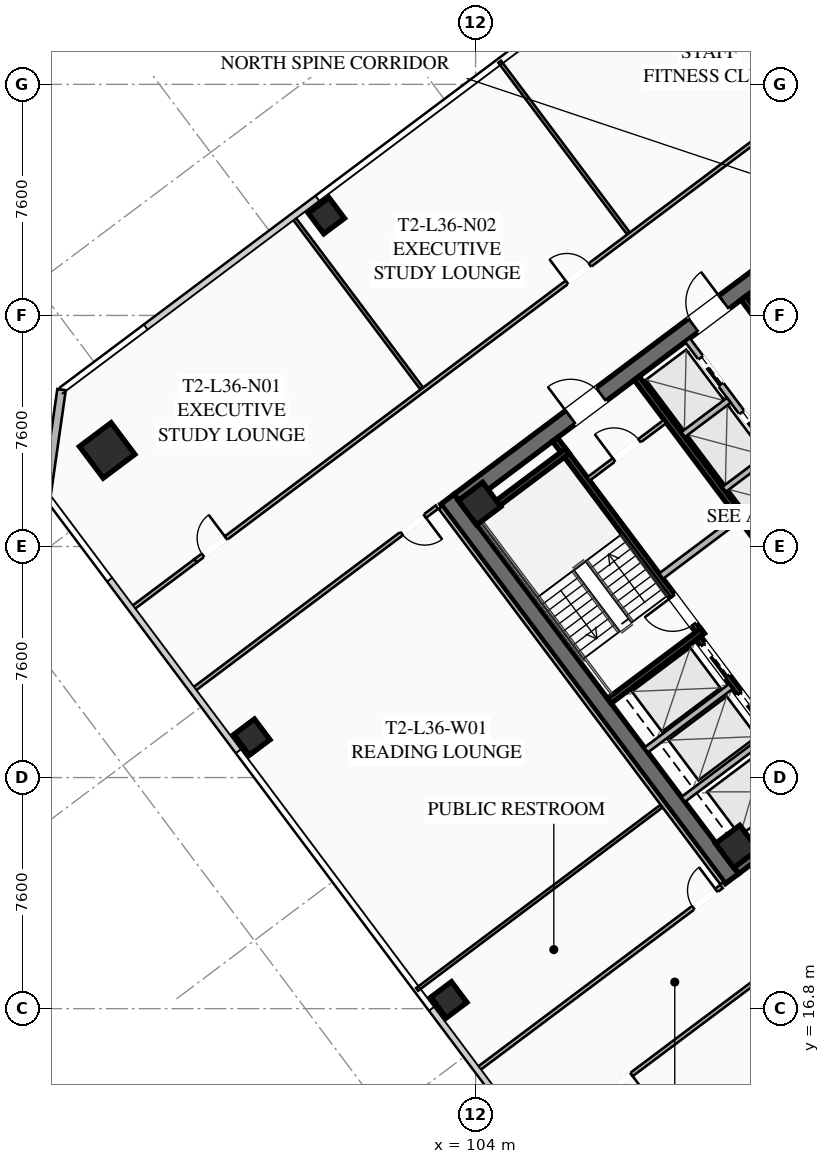
"""IFC4 building model, lengths in metres.
Left out: names, types, materials, properties, quantities, classifications, styles, units other than length and angle.
Written with IfcOpenShell. Run it as: python <this file> out.ifc"""

import sys

from ifc_helpers import new_model, si_unit, direction, frame, frame_2d, origin, origin_2d, place, context, subcontext, project, spatial, rectangle, hollow_rectangle, extrude, element, fill, save


model = new_model("IFC4")
c1 = context("Model", 3, precision=1e-05, world=origin(), true_north=direction((0.0, 1.0)))
c2 = subcontext(c1, "Body", "Model", "MODEL_VIEW")
j1 = project(units=[si_unit("LENGTHUNIT", "METRE"), si_unit("PLANEANGLEUNIT", "RADIAN")], contexts=[c1])
p1 = place(None, origin())
s1 = spatial("IfcSite", under=j1, at=p1, CompositionType="ELEMENT")
p2 = place(p1, origin())
s2 = spatial("IfcBuilding", under=s1, at=p2, CompositionType="ELEMENT")
p3 = place(p2, frame((0.0, 0.0, 135.7)))
s3 = spatial("IfcBuildingStorey", under=s2, at=p3, CompositionType="ELEMENT", Elevation=135.7)
p4 = place(p3, frame((112.436, 21.077, 0.0), z_axis=(0.0, 0.0, 1.0), x_axis=(-0.600005007985, 0.799996243986, 0.0)))
e1 = element("IfcWall", 1, at=p4, inside=s3, PredefinedType="SHEAR", context=c2, shape_type="SweptSolid", body=[
    extrude(rectangle(XDim=15.6, YDim=0.55, at=frame_2d((7.8, 0.0))), origin(), (0.0, 0.0, 1.0), 3.55),
])
p5 = place(p3, frame((124.539, 30.498, 0.0), z_axis=(0.0, 0.0, 1.0), x_axis=(-0.799998054672, -0.600002593761, 0.0)))
e2 = element("IfcWall", 2, at=p5, inside=s3, PredefinedType="SHEAR", context=c2, shape_type="SweptSolid", body=[
    extrude(rectangle(XDim=15.06, YDim=0.55, at=frame_2d((7.53, 0.0))), origin(), (0.0, 0.0, 1.0), 3.55),
])
p6 = place(p5, frame((9.23, 0.0, 0.0)))
e3 = element("IfcOpeningElement", 3, at=p6, cuts=e2, PredefinedType="OPENING", context=c2, shape_type="SweptSolid", body=[
    extrude(rectangle(XDim=1.25, YDim=2.25, at=frame_2d((0.625, 1.125))), frame((0.0, 0.285, 0.0), z_axis=(0.0, -1.0, 0.0), x_axis=(1.0, 0.0, 0.0)), (0.0, 0.0, 1.0), 0.57),
])
p7 = place(p5, frame((4.18, 0.0, 0.0)))
e4 = element("IfcOpeningElement", 4, at=p7, cuts=e2, PredefinedType="OPENING", context=c2, shape_type="SweptSolid", body=[
    extrude(rectangle(XDim=1.25, YDim=2.25, at=frame_2d((0.625, 1.125))), frame((0.0, 0.285, 0.0), z_axis=(0.0, -1.0, 0.0), x_axis=(1.0, 0.0, 0.0)), (0.0, 0.0, 1.0), 0.57),
])
p8 = place(p3, frame((103.461, 33.502, 0.0), z_axis=(0.0, 0.0, 1.0), x_axis=(0.799998054672, 0.600002593761, 0.0)))
e5 = element("IfcWall", 5, at=p8, inside=s3, PredefinedType="SHEAR", context=c2, shape_type="SweptSolid", body=[
    extrude(rectangle(XDim=15.06, YDim=0.55, at=frame_2d((7.53, 0.0))), origin(), (0.0, 0.0, 1.0), 3.55),
])
p9 = place(p8, frame((4.58, 0.0, 0.0)))
e6 = element("IfcOpeningElement", 6, at=p9, cuts=e5, PredefinedType="OPENING", context=c2, shape_type="SweptSolid", body=[
    extrude(rectangle(XDim=1.25, YDim=2.25, at=frame_2d((0.625, 1.125))), frame((0.0, 0.285, 0.0), z_axis=(0.0, -1.0, 0.0), x_axis=(1.0, 0.0, 0.0)), (0.0, 0.0, 1.0), 0.57),
])
p10 = place(p8, frame((9.63, 0.0, 0.0)))
e7 = element("IfcOpeningElement", 7, at=p10, cuts=e5, PredefinedType="OPENING", context=c2, shape_type="SweptSolid", body=[
    extrude(rectangle(XDim=1.25, YDim=2.25, at=frame_2d((0.625, 1.125))), frame((0.0, 0.285, 0.0), z_axis=(0.0, -1.0, 0.0), x_axis=(1.0, 0.0, 0.0)), (0.0, 0.0, 1.0), 0.57),
])
for number, where, z_axis, x_axis in (
    (8, (112.59, 22.13, 0.0), (0.0, 0.0, 1.0), (0.8, 0.6, 0.0)),
    (9, (104.13, 33.41, 0.0), (0.0, 0.0, 1.0), (0.8, 0.6, 0.0)),
):
    element("IfcColumn", number, at=place(p3, frame(where, z_axis=z_axis, x_axis=x_axis)), inside=s3, PredefinedType="COLUMN", context=c2, shape_type="SweptSolid", body=[
        extrude(hollow_rectangle(XDim=1.0, YDim=1.0, WallThickness=0.04, at=origin_2d()), origin(), (0.0, 0.0, 1.0), 3.37),
    ])
p11 = place(p3, frame((91.88, 35.16, 0.0), z_axis=(0.0, 0.0, 1.0), x_axis=(0.799999996291, 0.600000004945, 0.0)))
e10 = element("IfcColumn", 10, at=p11, inside=s3, PredefinedType="COLUMN", context=c2, shape_type="SweptSolid", body=[
    extrude(hollow_rectangle(XDim=1.3, YDim=1.3, WallThickness=0.05, at=origin_2d()), origin(), (0.0, 0.0, 1.0), 3.37),
])
for number, where, z_axis, x_axis in (
    (11, (99.09, 42.88, 0.0), (0.0, 0.0, 1.0), (0.8, 0.6, 0.0)),
    (12, (96.64, 25.73, 0.0), (0.0, 0.0, 1.0), (0.8, 0.6, 0.0)),
    (13, (103.12, 17.09, 0.0), (0.0, 0.0, 1.0), (0.8, 0.6, 0.0)),
):
    element("IfcColumn", number, at=place(p3, frame(where, z_axis=z_axis, x_axis=x_axis)), inside=s3, PredefinedType="COLUMN", context=c2, shape_type="SweptSolid", body=[
        extrude(hollow_rectangle(XDim=0.85, YDim=0.85, WallThickness=0.035, at=origin_2d()), origin(), (0.0, 0.0, 1.0), 3.37),
    ])
p12 = place(p3, frame((89.88, 33.66, 0.0), z_axis=(0.0, 0.0, 1.0), x_axis=(0.141421356237, 0.989949493661, 0.0)))
e14 = element("IfcWall", 14, at=p12, inside=s3, PredefinedType="SOLIDWALL", context=c2, shape_type="SweptSolid", body=[
    extrude(rectangle(XDim=3.536, YDim=0.28, at=frame_2d((1.768, 0.0))), origin(), (0.0, 0.0, 1.0), 3.37),
])
p13 = place(p3, frame((111.44, 29.08, 0.0), z_axis=(0.0, 0.0, 1.0), x_axis=(-0.59999029481, 0.8000072788, 0.0)))
e15 = element("IfcWall", 15, at=p13, inside=s3, PredefinedType="SHEAR", context=c2, shape_type="SweptSolid", body=[
    extrude(rectangle(XDim=8.05, YDim=0.2, at=frame_2d((4.025, 0.0))), origin(), (0.0, 0.0, 1.0), 3.37),
])
p14 = place(p13, frame((0.45, 0.0, 0.0)))
e16 = element("IfcOpeningElement", 16, at=p14, cuts=e15, PredefinedType="OPENING", context=c2, shape_type="SweptSolid", body=[
    extrude(rectangle(XDim=1.15, YDim=2.2, at=frame_2d((0.575, 1.1))), frame((0.0, 0.11, 0.0), z_axis=(0.0, -1.0, 0.0), x_axis=(1.0, 0.0, 0.0)), (0.0, 0.0, 1.0), 0.22),
])
for number, where, z_axis, x_axis in (
    (17, (108.396, 26.922, 0.0), (0.0, 0.0, 1.0), (0.8, 0.6, 0.0)),
    (18, (103.956, 32.842, 0.0), (0.0, 0.0, 1.0), (0.8, 0.6, 0.0)),
):
    element("IfcWall", number, at=place(p3, frame(where, z_axis=z_axis, x_axis=x_axis)), inside=s3, PredefinedType="SHEAR", context=c2, shape_type="SweptSolid", body=[
        extrude(rectangle(XDim=3.83, YDim=0.2, at=frame_2d((1.915, 0.0))), origin(), (0.0, 0.0, 1.0), 3.37),
    ])
p15 = place(p3, frame((117.998, 25.936, 0.0), z_axis=(0.0, 0.0, 1.0), x_axis=(-0.600002693989, 0.799997979501, 0.0)))
e19 = element("IfcWall", 19, at=p15, inside=s3, PredefinedType="SHEAR", context=c2, shape_type="SweptSolid", body=[
    extrude(rectangle(XDim=14.5, YDim=0.2, at=frame_2d((7.25, 0.0))), origin(), (0.0, 0.0, 1.0), 3.37),
])
p16 = place(p3, frame((110.104, 31.028, 0.0), z_axis=(0.0, 0.0, 1.0), x_axis=(0.800018601094, 0.59997519774, 0.0)))
e20 = element("IfcWall", 20, at=p16, inside=s3, PredefinedType="SOLIDWALL", context=c2, shape_type="SweptSolid", body=[
    extrude(rectangle(XDim=3.15, YDim=0.22, at=frame_2d((1.575, 0.0))), origin(), (0.0, 0.0, 1.0), 2.723),
])
p17 = place(p3, frame((115.19, 23.83, 0.0), z_axis=(0.0, 0.0, 1.0), x_axis=(-0.599993943644, 0.800004542231, 0.0)))
e21 = element("IfcWall", 21, at=p17, inside=s3, PredefinedType="SHEAR", context=c2, shape_type="SweptSolid", body=[
    extrude(rectangle(XDim=6.45, YDim=0.2, at=frame_2d((3.225, 0.0))), origin(), (0.0, 0.0, 1.0), 3.37),
])
p18 = place(p17, frame((4.875, 0.0, 0.0)))
e22 = element("IfcOpeningElement", 22, at=p18, cuts=e21, PredefinedType="OPENING", context=c2, shape_type="SweptSolid", body=[
    extrude(rectangle(XDim=1.3, YDim=2.25, at=frame_2d((0.65, 1.125))), frame((0.0, 0.11, 0.0), z_axis=(0.0, -1.0, 0.0), x_axis=(1.0, 0.0, 0.0)), (0.0, 0.0, 1.0), 0.22),
])
p19 = place(p17, frame((2.875, 0.0, 0.0)))
e23 = element("IfcOpeningElement", 23, at=p19, cuts=e21, PredefinedType="OPENING", context=c2, shape_type="SweptSolid", body=[
    extrude(rectangle(XDim=1.3, YDim=2.25, at=frame_2d((0.65, 1.125))), frame((0.0, 0.11, 0.0), z_axis=(0.0, -1.0, 0.0), x_axis=(1.0, 0.0, 0.0)), (0.0, 0.0, 1.0), 0.22),
])
p20 = place(p17, frame((0.675, 0.0, 0.0)))
e24 = element("IfcOpeningElement", 24, at=p20, cuts=e21, PredefinedType="OPENING", context=c2, shape_type="SweptSolid", body=[
    extrude(rectangle(XDim=1.3, YDim=2.25, at=frame_2d((0.65, 1.125))), frame((0.0, 0.11, 0.0), z_axis=(0.0, -1.0, 0.0), x_axis=(1.0, 0.0, 0.0)), (0.0, 0.0, 1.0), 0.22),
])
for number, where, z_axis, x_axis in (
    (25, (110.826, 23.682, 0.0), (0.0, 0.0, 1.0), (0.8, 0.6, 0.0)),
    (26, (109.608, 25.306, 0.0), (0.0, 0.0, 1.0), (0.8, 0.6, 0.0)),
):
    element("IfcWall", number, at=place(p3, frame(where, z_axis=z_axis, x_axis=x_axis)), inside=s3, PredefinedType="SOLIDWALL", context=c2, shape_type="SweptSolid", body=[
        extrude(rectangle(XDim=3.48, YDim=0.2, at=frame_2d((1.74, 0.0))), origin(), (0.0, 0.0, 1.0), 3.37),
    ])
p21 = place(p3, frame((112.81, 40.17, 0.0), z_axis=(0.0, 0.0, 1.0), x_axis=(0.599993943644, -0.800004542231, 0.0)))
e27 = element("IfcWall", 27, at=p21, inside=s3, PredefinedType="SHEAR", context=c2, shape_type="SweptSolid", body=[
    extrude(rectangle(XDim=6.45, YDim=0.2, at=frame_2d((3.225, 0.0))), origin(), (0.0, 0.0, 1.0), 3.37),
])
p22 = place(p3, frame((107.71, 34.22, 0.0), z_axis=(0.0, 0.0, 1.0), x_axis=(0.799981399002, 0.60002480053, 0.0)))
e28 = element("IfcWall", 28, at=p22, inside=s3, PredefinedType="PARTITIONING", context=c2, shape_type="SweptSolid", body=[
    extrude(rectangle(XDim=3.15, YDim=0.135, at=frame_2d((1.575, 0.0))), origin(), (0.0, 0.0, 1.0), 2.723),
])
p23 = place(p22, frame((1.05, 0.0, 0.0)))
e29 = element("IfcOpeningElement", 29, at=p23, cuts=e28, PredefinedType="OPENING", context=c2, shape_type="SweptSolid", body=[
    extrude(rectangle(XDim=1.05, YDim=2.2, at=frame_2d((0.525, 1.1))), frame((0.0, 0.077, 0.0), z_axis=(0.0, -1.0, 0.0), x_axis=(1.0, 0.0, 0.0)), (0.0, 0.0, 1.0), 0.155),
])
p24 = place(p3, frame((115.11, 33.27, 0.0), z_axis=(0.0, 0.0, 1.0), x_axis=(-0.600011322243, 0.799991508192, 0.0)))
e30 = element("IfcWall", 30, at=p24, inside=s3, PredefinedType="SOLIDWALL", context=c2, shape_type="SweptSolid", body=[
    extrude(rectangle(XDim=6.9, YDim=0.2, at=frame_2d((3.45, 0.0))), origin(), (0.0, 0.0, 1.0), 3.37),
])
p25 = place(p24, frame((0.575, 0.0, 0.0)))
e31 = element("IfcOpeningElement", 31, at=p25, cuts=e30, PredefinedType="OPENING", context=c2, shape_type="SweptSolid", body=[
    extrude(rectangle(XDim=1.1, YDim=2.2, at=frame_2d((0.55, 1.1))), frame((0.0, 0.11, 0.0), z_axis=(0.0, -1.0, 0.0), x_axis=(1.0, 0.0, 0.0)), (0.0, 0.0, 1.0), 0.22),
])
p26 = place(p24, frame((2.825, 0.0, 0.0)))
e32 = element("IfcOpeningElement", 32, at=p26, cuts=e30, PredefinedType="OPENING", context=c2, shape_type="SweptSolid", body=[
    extrude(rectangle(XDim=1.1, YDim=2.2, at=frame_2d((0.55, 1.1))), frame((0.0, 0.11, 0.0), z_axis=(0.0, -1.0, 0.0), x_axis=(1.0, 0.0, 0.0)), (0.0, 0.0, 1.0), 0.22),
])
p27 = place(p24, frame((5.075, 0.0, 0.0)))
e33 = element("IfcOpeningElement", 33, at=p27, cuts=e30, PredefinedType="OPENING", context=c2, shape_type="SweptSolid", body=[
    extrude(rectangle(XDim=1.1, YDim=2.2, at=frame_2d((0.55, 1.1))), frame((0.0, 0.11, 0.0), z_axis=(0.0, -1.0, 0.0), x_axis=(1.0, 0.0, 0.0)), (0.0, 0.0, 1.0), 0.22),
])
p28 = place(p3, frame((112.176, 33.882, 0.0), z_axis=(0.0, 0.0, 1.0), x_axis=(0.8, 0.6, 0.0)))
e34 = element("IfcWall", 34, at=p28, inside=s3, PredefinedType="SOLIDWALL", context=c2, shape_type="SweptSolid", body=[
    extrude(rectangle(XDim=1.88, YDim=0.2, at=frame_2d((0.94, 0.0))), origin(), (0.0, 0.0, 1.0), 3.37),
])
p29 = place(p3, frame((110.826, 35.682, 0.0), z_axis=(0.0, 0.0, 1.0), x_axis=(0.799984418148, 0.600020775241, 0.0)))
e35 = element("IfcWall", 35, at=p29, inside=s3, PredefinedType="SOLIDWALL", context=c2, shape_type="SweptSolid", body=[
    extrude(rectangle(XDim=1.88, YDim=0.2, at=frame_2d((0.94, 0.0))), origin(), (0.0, 0.0, 1.0), 3.37),
])
p30 = place(p3, frame((94.79, 31.53, 0.0), z_axis=(0.0, 0.0, 1.0), x_axis=(0.8, 0.6, 0.0)))
e36 = element("IfcWall", 36, at=p30, inside=s3, PredefinedType="PARTITIONING", context=c2, shape_type="SweptSolid", body=[
    extrude(rectangle(XDim=31.3, YDim=0.135, at=frame_2d((15.65, 0.0))), origin(), (0.0, 0.0, 1.0), 2.723),
])
p31 = place(p30, frame((0.3, 0.0, 0.0)))
e37 = element("IfcOpeningElement", 37, at=p31, cuts=e36, PredefinedType="OPENING", context=c2, shape_type="SweptSolid", body=[
    extrude(rectangle(XDim=0.95, YDim=2.05, at=frame_2d((0.475, 1.025))), frame((0.0, 0.077, 0.0), z_axis=(0.0, -1.0, 0.0), x_axis=(1.0, 0.0, 0.0)), (0.0, 0.0, 1.0), 0.155),
])
p32 = place(p30, frame((15.263, 0.0, 0.0)))
e38 = element("IfcOpeningElement", 38, at=p32, cuts=e36, PredefinedType="OPENING", context=c2, shape_type="SweptSolid", body=[
    extrude(rectangle(XDim=0.95, YDim=2.05, at=frame_2d((0.475, 1.025))), frame((0.0, 0.077, 0.0), z_axis=(0.0, -1.0, 0.0), x_axis=(1.0, 0.0, 0.0)), (0.0, 0.0, 1.0), 0.155),
])
p33 = place(p30, frame((30.05, 0.0, 0.0)))
e39 = element("IfcOpeningElement", 39, at=p33, cuts=e36, PredefinedType="OPENING", context=c2, shape_type="SweptSolid", body=[
    extrude(rectangle(XDim=0.95, YDim=2.05, at=frame_2d((0.475, 1.025))), frame((0.0, 0.077, 0.0), z_axis=(0.0, -1.0, 0.0), x_axis=(1.0, 0.0, 0.0)), (0.0, 0.0, 1.0), 0.155),
])
p34 = place(p3, frame((92.686, 29.952, 0.0), z_axis=(0.0, 0.0, 1.0), x_axis=(0.799977721118, 0.600029704027, 0.0)))
e40 = element("IfcWall", 40, at=p34, inside=s3, PredefinedType="PARTITIONING", context=c2, shape_type="SweptSolid", body=[
    extrude(rectangle(XDim=2.63, YDim=0.135, at=frame_2d((1.315, 0.0))), origin(), (0.0, 0.0, 1.0), 2.723),
])
p35 = place(p3, frame((102.222, 37.204, 0.0), z_axis=(0.0, 0.0, 1.0), x_axis=(-0.600005540843, 0.799995844338, 0.0)))
e41 = element("IfcWall", 41, at=p35, inside=s3, PredefinedType="PARTITIONING", context=c2, shape_type="SweptSolid", body=[
    extrude(rectangle(XDim=7.05, YDim=0.11, at=frame_2d((3.525, 0.0))), origin(), (0.0, 0.0, 1.0), 2.723),
])
p36 = place(p3, frame((109.022, 42.304, 0.0), z_axis=(0.0, 0.0, 1.0), x_axis=(-0.599988918536, 0.800008310978, 0.0)))
e42 = element("IfcWall", 42, at=p36, inside=s3, PredefinedType="PARTITIONING", context=c2, shape_type="SweptSolid", body=[
    extrude(rectangle(XDim=7.05, YDim=0.11, at=frame_2d((3.525, 0.0))), origin(), (0.0, 0.0, 1.0), 2.723),
])
p37 = place(p3, frame((133.102, 32.614, 0.0), z_axis=(0.0, 0.0, 1.0), x_axis=(-0.8, -0.6, 0.0)))
e43 = element("IfcWall", 43, at=p37, inside=s3, PredefinedType="PARTITIONING", context=c2, shape_type="SweptSolid", body=[
    extrude(rectangle(XDim=31.3, YDim=0.135, at=frame_2d((15.65, 0.0))), origin(), (0.0, 0.0, 1.0), 2.723),
])
p38 = place(p37, frame((29.97, 0.0, 0.0)))
e44 = element("IfcOpeningElement", 44, at=p38, cuts=e43, PredefinedType="OPENING", context=c2, shape_type="SweptSolid", body=[
    extrude(rectangle(XDim=0.95, YDim=2.05, at=frame_2d((0.475, 1.025))), frame((0.0, 0.077, 0.0), z_axis=(0.0, -1.0, 0.0), x_axis=(1.0, 0.0, 0.0)), (0.0, 0.0, 1.0), 0.155),
])
p39 = place(p37, frame((0.38, 0.0, 0.0)))
e45 = element("IfcOpeningElement", 45, at=p39, cuts=e43, PredefinedType="OPENING", context=c2, shape_type="SweptSolid", body=[
    extrude(rectangle(XDim=0.95, YDim=2.05, at=frame_2d((0.475, 1.025))), frame((0.0, 0.077, 0.0), z_axis=(0.0, -1.0, 0.0), x_axis=(1.0, 0.0, 0.0)), (0.0, 0.0, 1.0), 0.155),
])
p40 = place(p3, frame((112.104, 20.928, 0.0), z_axis=(0.0, 0.0, 1.0), x_axis=(-0.599994940075, 0.800003794918, 0.0)))
e46 = element("IfcWall", 46, at=p40, inside=s3, PredefinedType="PARTITIONING", context=c2, shape_type="SweptSolid", body=[
    extrude(rectangle(XDim=15.44, YDim=0.135, at=frame_2d((7.72, 0.0))), origin(), (0.0, 0.0, 1.0), 2.723),
])
p41 = place(p3, frame((102.728, 33.296, 0.0), z_axis=(0.0, 0.0, 1.0), x_axis=(-0.800002918023, -0.599996109283, 0.0)))
e47 = element("IfcWall", 47, at=p41, inside=s3, PredefinedType="PARTITIONING", context=c2, shape_type="SweptSolid", body=[
    extrude(rectangle(XDim=10.04, YDim=0.135, at=frame_2d((5.02, 0.0))), origin(), (0.0, 0.0, 1.0), 2.723),
])
p42 = place(p41, frame((0.5, 0.0, 0.0)))
e48 = element("IfcOpeningElement", 48, at=p42, cuts=e47, PredefinedType="OPENING", context=c2, shape_type="SweptSolid", body=[
    extrude(rectangle(XDim=0.95, YDim=2.05, at=frame_2d((0.475, 1.025))), frame((0.0, 0.077, 0.0), z_axis=(0.0, -1.0, 0.0), x_axis=(1.0, 0.0, 0.0)), (0.0, 0.0, 1.0), 0.155),
])
p43 = place(p3, frame((104.056, 14.792, 0.0), z_axis=(0.0, 0.0, 1.0), x_axis=(0.800002918023, 0.599996109283, 0.0)))
e49 = element("IfcWall", 49, at=p43, inside=s3, PredefinedType="PARTITIONING", context=c2, shape_type="SweptSolid", body=[
    extrude(rectangle(XDim=10.04, YDim=0.135, at=frame_2d((5.02, 0.0))), origin(), (0.0, 0.0, 1.0), 2.723),
])
p44 = place(p43, frame((8.88, 0.0, 0.0)))
e50 = element("IfcOpeningElement", 50, at=p44, cuts=e49, PredefinedType="OPENING", context=c2, shape_type="SweptSolid", body=[
    extrude(rectangle(XDim=0.95, YDim=2.05, at=frame_2d((0.475, 1.025))), frame((0.0, 0.077, 0.0), z_axis=(0.0, -1.0, 0.0), x_axis=(1.0, 0.0, 0.0)), (0.0, 0.0, 1.0), 0.155),
])
p45 = place(p3, frame((102.076, 17.432, 0.0), z_axis=(0.0, 0.0, 1.0), x_axis=(0.799991245945, 0.600011671896, 0.0)))
e51 = element("IfcWall", 51, at=p45, inside=s3, PredefinedType="PARTITIONING", context=c2, shape_type="SweptSolid", body=[
    extrude(rectangle(XDim=10.04, YDim=0.11, at=frame_2d((5.02, 0.0))), origin(), (0.0, 0.0, 1.0), 2.723),
])
p46 = place(p9, origin())
e52 = element("IfcDoor", 52, at=p46, inside=s3, OperationType="SINGLE_SWING_LEFT", PredefinedType="DOOR", context=c2, shape_type="SweptSolid", body=[
    extrude(rectangle(XDim=1.25, YDim=2.25, at=frame_2d((0.625, 1.125))), frame((0.0, 0.025, 0.0), z_axis=(0.0, -1.0, 0.0), x_axis=(1.0, 0.0, 0.0)), (0.0, 0.0, 1.0), 0.05),
])
fill(e6, e52)
p47 = place(p10, origin())
e53 = element("IfcDoor", 53, at=p47, inside=s3, OperationType="SINGLE_SWING_RIGHT", PredefinedType="DOOR", context=c2, shape_type="SweptSolid", body=[
    extrude(rectangle(XDim=1.25, YDim=2.25, at=frame_2d((0.625, 1.125))), frame((0.0, 0.025, 0.0), z_axis=(0.0, -1.0, 0.0), x_axis=(1.0, 0.0, 0.0)), (0.0, 0.0, 1.0), 0.05),
])
fill(e7, e53)
p48 = place(p14, origin())
e54 = element("IfcDoor", 54, at=p48, inside=s3, OperationType="SINGLE_SWING_RIGHT", PredefinedType="DOOR", context=c2, shape_type="SweptSolid", body=[
    extrude(rectangle(XDim=1.15, YDim=2.2, at=frame_2d((0.575, 1.1))), frame((0.0, 0.025, 0.0), z_axis=(0.0, -1.0, 0.0), x_axis=(1.0, 0.0, 0.0)), (0.0, 0.0, 1.0), 0.05),
])
fill(e16, e54)
p49 = place(p23, origin())
e55 = element("IfcDoor", 55, at=p49, inside=s3, OperationType="SINGLE_SWING_LEFT", PredefinedType="DOOR", context=c2, shape_type="SweptSolid", body=[
    extrude(rectangle(XDim=1.05, YDim=2.2, at=frame_2d((0.525, 1.1))), frame((0.0, 0.025, 0.0), z_axis=(0.0, -1.0, 0.0), x_axis=(1.0, 0.0, 0.0)), (0.0, 0.0, 1.0), 0.05),
])
fill(e29, e55)
p50 = place(p31, origin())
e56 = element("IfcDoor", 56, at=p50, inside=s3, OperationType="SINGLE_SWING_RIGHT", PredefinedType="DOOR", context=c2, shape_type="SweptSolid", body=[
    extrude(rectangle(XDim=0.95, YDim=2.05, at=frame_2d((0.475, 1.025))), frame((0.0, 0.025, 0.0), z_axis=(0.0, -1.0, 0.0), x_axis=(1.0, 0.0, 0.0)), (0.0, 0.0, 1.0), 0.05),
])
fill(e37, e56)
p51 = place(p32, origin())
e57 = element("IfcDoor", 57, at=p51, inside=s3, OperationType="SINGLE_SWING_LEFT", PredefinedType="DOOR", context=c2, shape_type="SweptSolid", body=[
    extrude(rectangle(XDim=0.95, YDim=2.05, at=frame_2d((0.475, 1.025))), frame((0.0, 0.025, 0.0), z_axis=(0.0, -1.0, 0.0), x_axis=(1.0, 0.0, 0.0)), (0.0, 0.0, 1.0), 0.05),
])
fill(e38, e57)
p52 = place(p38, origin())
e58 = element("IfcDoor", 58, at=p52, inside=s3, OperationType="SINGLE_SWING_LEFT", PredefinedType="DOOR", context=c2, shape_type="SweptSolid", body=[
    extrude(rectangle(XDim=0.95, YDim=2.05, at=frame_2d((0.475, 1.025))), frame((0.0, 0.025, 0.0), z_axis=(0.0, -1.0, 0.0), x_axis=(1.0, 0.0, 0.0)), (0.0, 0.0, 1.0), 0.05),
])
fill(e44, e58)
p53 = place(p42, origin())
e59 = element("IfcDoor", 59, at=p53, inside=s3, OperationType="SINGLE_SWING_LEFT", PredefinedType="DOOR", context=c2, shape_type="SweptSolid", body=[
    extrude(rectangle(XDim=0.95, YDim=2.05, at=frame_2d((0.475, 1.025))), frame((0.0, 0.025, 0.0), z_axis=(0.0, -1.0, 0.0), x_axis=(1.0, 0.0, 0.0)), (0.0, 0.0, 1.0), 0.05),
])
fill(e48, e59)
p54 = place(p44, origin())
e60 = element("IfcDoor", 60, at=p54, inside=s3, OperationType="SINGLE_SWING_RIGHT", PredefinedType="DOOR", context=c2, shape_type="SweptSolid", body=[
    extrude(rectangle(XDim=0.95, YDim=2.05, at=frame_2d((0.475, 1.025))), frame((0.0, 0.025, 0.0), z_axis=(0.0, -1.0, 0.0), x_axis=(1.0, 0.0, 0.0)), (0.0, 0.0, 1.0), 0.05),
])
fill(e50, e60)
p55 = place(p18, origin())
e61 = element("IfcDoor", 61, at=p55, inside=s3, OperationType="SLIDING_TO_LEFT", PredefinedType="DOOR", context=c2, shape_type="SweptSolid", body=[
    extrude(rectangle(XDim=1.3, YDim=2.25, at=frame_2d((0.65, 1.125))), frame((0.0, 0.025, 0.0), z_axis=(0.0, -1.0, 0.0), x_axis=(1.0, 0.0, 0.0)), (0.0, 0.0, 1.0), 0.05),
])
fill(e22, e61)
p56 = place(p19, origin())
e62 = element("IfcDoor", 62, at=p56, inside=s3, OperationType="SLIDING_TO_LEFT", PredefinedType="DOOR", context=c2, shape_type="SweptSolid", body=[
    extrude(rectangle(XDim=1.3, YDim=2.25, at=frame_2d((0.65, 1.125))), frame((0.0, 0.025, 0.0), z_axis=(0.0, -1.0, 0.0), x_axis=(1.0, 0.0, 0.0)), (0.0, 0.0, 1.0), 0.05),
])
fill(e23, e62)
p57 = place(p26, origin())
e63 = element("IfcDoor", 63, at=p57, inside=s3, OperationType="SLIDING_TO_LEFT", PredefinedType="DOOR", context=c2, shape_type="SweptSolid", body=[
    extrude(rectangle(XDim=1.1, YDim=2.2, at=frame_2d((0.55, 1.1))), frame((0.0, 0.025, 0.0), z_axis=(0.0, -1.0, 0.0), x_axis=(1.0, 0.0, 0.0)), (0.0, 0.0, 1.0), 0.05),
])
fill(e32, e63)
p58 = place(p27, origin())
e64 = element("IfcDoor", 64, at=p58, inside=s3, OperationType="SLIDING_TO_LEFT", PredefinedType="DOOR", context=c2, shape_type="SweptSolid", body=[
    extrude(rectangle(XDim=1.1, YDim=2.2, at=frame_2d((0.55, 1.1))), frame((0.0, 0.025, 0.0), z_axis=(0.0, -1.0, 0.0), x_axis=(1.0, 0.0, 0.0)), (0.0, 0.0, 1.0), 0.05),
])
fill(e33, e64)
save(model, sys.argv[1])
